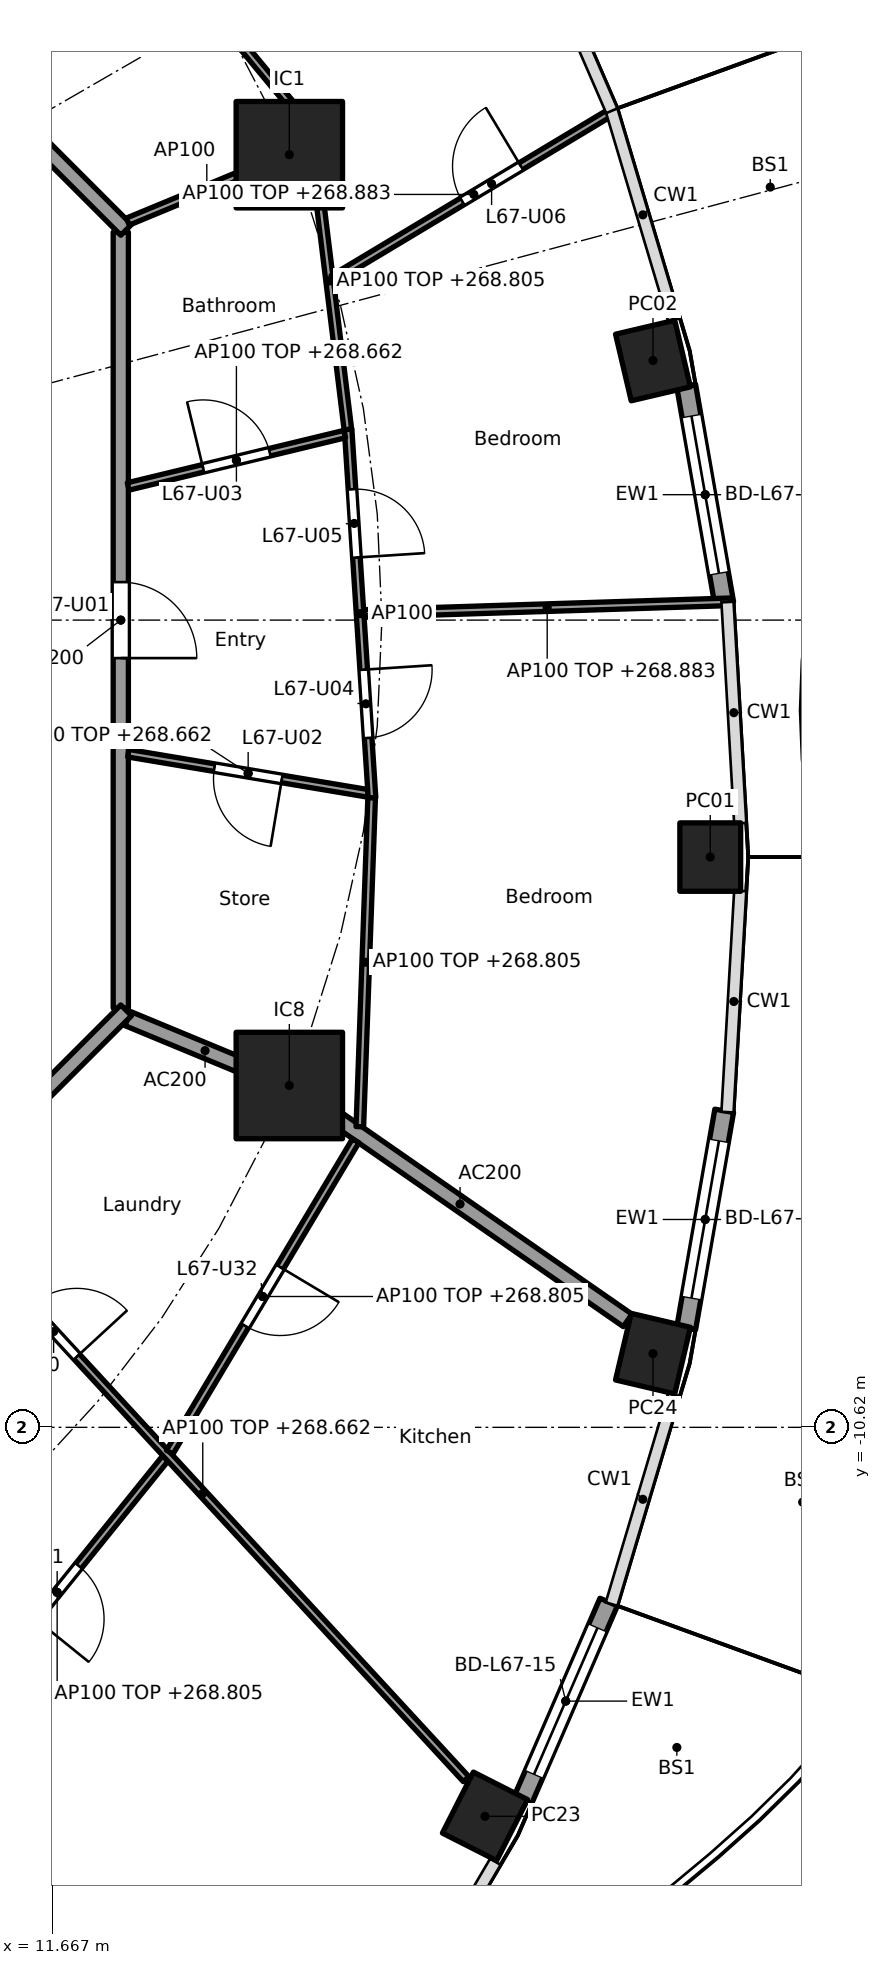
"""IFC4 building model, lengths in metres.
Left out: names, types, materials, properties, quantities, classifications, styles, units other than length and angle.
Written with IfcOpenShell. Run it as: python <this file> out.ifc"""

import sys

from ifc_helpers import new_model, si_unit, direction, frame, frame_2d, origin, origin_2d, place, context, subcontext, project, spatial, rectangle, hollow_rectangle, extrude, element, fill, save


model = new_model("IFC4")
c1 = context("Model", 3, precision=1e-05, world=origin(), true_north=direction((0.0, 1.0)))
c2 = subcontext(c1, "Body", "Model", "MODEL_VIEW")
j1 = project(units=[si_unit("LENGTHUNIT", "METRE"), si_unit("PLANEANGLEUNIT", "RADIAN")], contexts=[c1])
p1 = place(None, origin())
s1 = spatial("IfcSite", under=j1, at=p1, CompositionType="ELEMENT")
p2 = place(p1, origin())
s2 = spatial("IfcBuilding", under=s1, at=p2, CompositionType="ELEMENT")
p3 = place(p2, frame((0.0, 0.0, 265.9)))
s3 = spatial("IfcBuildingStorey", under=s2, at=p3, CompositionType="ELEMENT", Elevation=265.9)
for number, where, z_axis, x_axis in (
    (1, (20.32, -3.118, 0.0), (0.0, 0.0, 1.0), (0.0, 1.0, 0.0)),
    (2, (19.566, 3.415, 0.0), (0.0, 0.0, 1.0), (-0.229, 0.973, 0.0)),
    (3, (17.356, -15.738, 0.0), (0.0, 0.0, 1.0), (0.452, 0.892, 0.0)),
    (4, (19.566, -9.65, 0.0), (0.0, 0.0, 1.0), (0.229, 0.973, 0.0)),
):
    element("IfcColumn", number, at=place(p3, frame(where, z_axis=z_axis, x_axis=x_axis)), inside=s3, PredefinedType="COLUMN", context=c2, shape_type="SweptSolid", body=[
        extrude(hollow_rectangle(XDim=0.9, YDim=0.8, WallThickness=0.028, at=origin_2d()), origin(), (0.0, 0.0, 1.0), 3.7),
    ])
for number, where, z_axis, x_axis in (
    (5, (14.782, 6.123, 0.0), (0.0, 0.0, 1.0), (1.0, 0.0, 0.0)),
    (6, (14.782, -6.123, 0.0), (0.0, 0.0, 1.0), (1.0, 0.0, 0.0)),
):
    element("IfcColumn", number, at=place(p3, frame(where, z_axis=z_axis, x_axis=x_axis)), inside=s3, PredefinedType="COLUMN", context=c2, shape_type="SweptSolid", body=[
        extrude(rectangle(XDim=1.4, YDim=1.4, at=origin_2d()), origin(), (0.0, 0.0, 1.0), 3.7),
    ])
p4 = place(p3, frame((20.004, 3.08, 0.0), z_axis=(0.0, 0.0, 1.0), x_axis=(0.172182411767, -0.985065082661, 0.0)))
e7 = element("IfcWall", 7, at=p4, inside=s3, PredefinedType="SOLIDWALL", context=c2, shape_type="SweptSolid", body=[
    extrude(rectangle(XDim=2.903, YDim=0.25, at=frame_2d((1.451, 0.0))), origin(), (0.0, 0.0, 1.0), 3.44),
])
p5 = place(p4, frame((0.401, 0.0, 0.0)))
e8 = element("IfcOpeningElement", 8, at=p5, cuts=e7, PredefinedType="OPENING", context=c2, shape_type="SweptSolid", body=[
    extrude(rectangle(XDim=2.1, YDim=2.4, at=frame_2d((1.05, 1.2))), frame((0.0, 0.135, 0.0), z_axis=(0.0, -1.0, 0.0), x_axis=(1.0, 0.0, 0.0)), (0.0, 0.0, 1.0), 0.27),
])
p6 = place(p3, frame((18.983, -12.918, 0.0), z_axis=(0.0, 0.0, 1.0), x_axis=(-0.397597791596, -0.9175598052, 0.0)))
e9 = element("IfcWall", 9, at=p6, inside=s3, PredefinedType="SOLIDWALL", context=c2, shape_type="SweptSolid", body=[
    extrude(rectangle(XDim=2.841, YDim=0.25, at=frame_2d((1.42, 0.0))), origin(), (0.0, 0.0, 1.0), 3.44),
])
p7 = place(p6, frame((0.371, 0.0, 0.0)))
e10 = element("IfcOpeningElement", 10, at=p7, cuts=e9, PredefinedType="OPENING", context=c2, shape_type="SweptSolid", body=[
    extrude(rectangle(XDim=2.1, YDim=2.4, at=frame_2d((1.05, 1.2))), frame((0.0, 0.135, 0.0), z_axis=(0.0, -1.0, 0.0), x_axis=(1.0, 0.0, 0.0)), (0.0, 0.0, 1.0), 0.27),
])
p8 = place(p3, frame((20.503, -6.456, 0.0), z_axis=(0.0, 0.0, 1.0), x_axis=(-0.172182411767, -0.985065082661, 0.0)))
e11 = element("IfcWall", 11, at=p8, inside=s3, PredefinedType="SOLIDWALL", context=c2, shape_type="SweptSolid", body=[
    extrude(rectangle(XDim=2.903, YDim=0.25, at=frame_2d((1.451, 0.0))), origin(), (0.0, 0.0, 1.0), 3.44),
])
p9 = place(p8, frame((0.401, 0.0, 0.0)))
e12 = element("IfcOpeningElement", 12, at=p9, cuts=e11, PredefinedType="OPENING", context=c2, shape_type="SweptSolid", body=[
    extrude(rectangle(XDim=2.1, YDim=2.4, at=frame_2d((1.05, 1.2))), frame((0.0, 0.135, 0.0), z_axis=(0.0, -1.0, 0.0), x_axis=(1.0, 0.0, 0.0)), (0.0, 0.0, 1.0), 0.27),
])
p10 = place(p3, frame((12.657, -5.243, 0.0), z_axis=(0.0, 0.0, 1.0), x_axis=(0.92383017907, -0.382802560388, 0.0)))
e13 = element("IfcWall", 13, at=p10, inside=s3, PredefinedType="PARTITIONING", context=c2, shape_type="SweptSolid", body=[
    extrude(rectangle(XDim=2.2, YDim=0.2, at=frame_2d((1.1, 0.0))), origin(), (0.0, 0.0, 1.0), 3.44),
])
p11 = place(p3, frame((14.823, -6.151, 0.0), z_axis=(0.0, 0.0, 1.0), x_axis=(0.821435065081, -0.570302054928, 0.0)))
e14 = element("IfcWall", 14, at=p11, inside=s3, PredefinedType="PARTITIONING", context=c2, shape_type="SweptSolid", body=[
    extrude(rectangle(XDim=5.368, YDim=0.2, at=frame_2d((2.684, 0.0))), origin(), (0.0, 0.0, 1.0), 3.44),
])
p12 = place(p3, frame((12.565, -5.104, 0.0), z_axis=(0.0, 0.0, 1.0), x_axis=(0.0, 1.0, 0.0)))
e15 = element("IfcWall", 15, at=p12, inside=s3, PredefinedType="PARTITIONING", context=c2, shape_type="SweptSolid", body=[
    extrude(rectangle(XDim=10.209, YDim=0.2, at=frame_2d((5.104, 0.0))), origin(), (0.0, 0.0, 1.0), 3.44),
])
p13 = place(p12, frame((4.604, 0.0, 0.0)))
e16 = element("IfcOpeningElement", 16, at=p13, cuts=e15, PredefinedType="OPENING", context=c2, shape_type="SweptSolid", body=[
    extrude(rectangle(XDim=1.0, YDim=2.1, at=frame_2d((0.5, 1.05))), frame((0.0, 0.11, 0.0), z_axis=(0.0, -1.0, 0.0), x_axis=(1.0, 0.0, 0.0)), (0.0, 0.0, 1.0), 0.22),
])
p14 = place(p3, frame((12.635, 5.134, 0.0), z_axis=(0.0, 0.0, 1.0), x_axis=(-0.707106781187, 0.707106781187, 0.0)))
e17 = element("IfcWall", 17, at=p14, inside=s3, PredefinedType="PARTITIONING", context=c2, shape_type="SweptSolid", body=[
    extrude(rectangle(XDim=10.609, YDim=0.2, at=frame_2d((5.305, 0.0))), origin(), (0.0, 0.0, 1.0), 3.44),
])
p15 = place(p3, frame((5.275, -12.494, 0.0), z_axis=(0.0, 0.0, 1.0), x_axis=(0.707106781187, 0.707106781187, 0.0)))
e18 = element("IfcWall", 18, at=p15, inside=s3, PredefinedType="PARTITIONING", context=c2, shape_type="SweptSolid", body=[
    extrude(rectangle(XDim=10.409, YDim=0.2, at=frame_2d((5.205, 0.0))), origin(), (0.0, 0.0, 1.0), 3.44),
])
p16 = place(p15, frame((4.604, 0.0, 0.0)))
e19 = element("IfcOpeningElement", 19, at=p16, cuts=e18, PredefinedType="OPENING", context=c2, shape_type="SweptSolid", body=[
    extrude(rectangle(XDim=1.0, YDim=2.1, at=frame_2d((0.5, 1.05))), frame((0.0, 0.11, 0.0), z_axis=(0.0, -1.0, 0.0), x_axis=(1.0, 0.0, 0.0)), (0.0, 0.0, 1.0), 0.22),
])
p17 = place(p3, frame((12.663, -1.751, 0.0), z_axis=(0.0, 0.0, 1.0), x_axis=(0.98626156497, -0.165191178529, 0.0)))
e20 = element("IfcWall", 20, at=p17, inside=s3, PredefinedType="PARTITIONING", context=c2, shape_type="SweptSolid", body=[
    extrude(rectangle(XDim=3.198, YDim=0.1, at=frame_2d((1.599, 0.0))), origin(), (0.0, 0.0, 1.0), 2.762),
])
p18 = place(p17, frame((1.149, 0.0, 0.0)))
e21 = element("IfcOpeningElement", 21, at=p18, cuts=e20, PredefinedType="OPENING", context=c2, shape_type="SweptSolid", body=[
    extrude(rectangle(XDim=0.9, YDim=2.1, at=frame_2d((0.45, 1.05))), frame((0.0, 0.06, 0.0), z_axis=(0.0, -1.0, 0.0), x_axis=(1.0, 0.0, 0.0)), (0.0, 0.0, 1.0), 0.12),
])
p19 = place(p3, frame((15.87, -2.338, 0.0), z_axis=(0.0, 0.0, 1.0), x_axis=(-0.064797294757, 0.997898447034, 0.0)))
e22 = element("IfcWall", 22, at=p19, inside=s3, PredefinedType="PARTITIONING", context=c2, shape_type="SweptSolid", body=[
    extrude(rectangle(XDim=4.857, YDim=0.1, at=frame_2d((2.428, 0.0))), origin(), (0.0, 0.0, 1.0), 3.44),
])
p20 = place(p19, frame((0.789, 0.0, 0.0)))
e23 = element("IfcOpeningElement", 23, at=p20, cuts=e22, PredefinedType="OPENING", context=c2, shape_type="SweptSolid", body=[
    extrude(rectangle(XDim=0.9, YDim=2.1, at=frame_2d((0.45, 1.05))), frame((0.0, 0.06, 0.0), z_axis=(0.0, -1.0, 0.0), x_axis=(1.0, 0.0, 0.0)), (0.0, 0.0, 1.0), 0.12),
])
p21 = place(p19, frame((3.167, 0.0, 0.0)))
e24 = element("IfcOpeningElement", 24, at=p21, cuts=e22, PredefinedType="OPENING", context=c2, shape_type="SweptSolid", body=[
    extrude(rectangle(XDim=0.9, YDim=2.1, at=frame_2d((0.45, 1.05))), frame((0.0, 0.06, 0.0), z_axis=(0.0, -1.0, 0.0), x_axis=(1.0, 0.0, 0.0)), (0.0, 0.0, 1.0), 0.12),
])
p22 = place(p3, frame((15.865, -2.338, 0.0), z_axis=(0.0, 0.0, 1.0), x_axis=(-0.035864509465, -0.999356661538, 0.0)))
e25 = element("IfcWall", 25, at=p22, inside=s3, PredefinedType="PARTITIONING", context=c2, shape_type="SweptSolid", body=[
    extrude(rectangle(XDim=4.329, YDim=0.1, at=frame_2d((2.165, 0.0))), origin(), (0.0, 0.0, 1.0), 2.905),
])
p23 = place(p3, frame((15.763, 0.087, 0.0), z_axis=(0.0, 0.0, 1.0), x_axis=(0.999492034598, 0.03186962151, 0.0)))
e26 = element("IfcWall", 26, at=p23, inside=s3, PredefinedType="PARTITIONING", context=c2, shape_type="SweptSolid", body=[
    extrude(rectangle(XDim=4.826, YDim=0.1, at=frame_2d((2.413, 0.0))), origin(), (0.0, 0.0, 1.0), 2.983),
])
p24 = place(p3, frame((12.662, 1.758, 0.0), z_axis=(0.0, 0.0, 1.0), x_axis=(0.972004827836, 0.234960879007, 0.0)))
e27 = element("IfcWall", 27, at=p24, inside=s3, PredefinedType="PARTITIONING", context=c2, shape_type="SweptSolid", body=[
    extrude(rectangle(XDim=2.93, YDim=0.1, at=frame_2d((1.465, 0.0))), origin(), (0.0, 0.0, 1.0), 2.762),
])
p25 = place(p24, frame((1.015, 0.0, 0.0)))
e28 = element("IfcOpeningElement", 28, at=p25, cuts=e27, PredefinedType="OPENING", context=c2, shape_type="SweptSolid", body=[
    extrude(rectangle(XDim=0.9, YDim=2.1, at=frame_2d((0.45, 1.05))), frame((0.0, 0.06, 0.0), z_axis=(0.0, -1.0, 0.0), x_axis=(1.0, 0.0, 0.0)), (0.0, 0.0, 1.0), 0.12),
])
p26 = place(p3, frame((15.552, 2.508, 0.0), z_axis=(0.0, 0.0, 1.0), x_axis=(-0.12196631785, 0.992534239868, 0.0)))
e29 = element("IfcWall", 29, at=p26, inside=s3, PredefinedType="PARTITIONING", context=c2, shape_type="SweptSolid", body=[
    extrude(rectangle(XDim=3.937, YDim=0.1, at=frame_2d((1.969, 0.0))), origin(), (0.0, 0.0, 1.0), 2.905),
])
p27 = place(p3, frame((15.355, 4.488, 0.0), z_axis=(0.0, 0.0, 1.0), x_axis=(0.85763237524, 0.514263268123, 0.0)))
e30 = element("IfcWall", 30, at=p27, inside=s3, PredefinedType="PARTITIONING", context=c2, shape_type="SweptSolid", body=[
    extrude(rectangle(XDim=4.324, YDim=0.1, at=frame_2d((2.162, 0.0))), origin(), (0.0, 0.0, 1.0), 2.983),
])
p28 = place(p27, frame((1.985, 0.0, 0.0)))
e31 = element("IfcOpeningElement", 31, at=p28, cuts=e30, PredefinedType="OPENING", context=c2, shape_type="SweptSolid", body=[
    extrude(rectangle(XDim=0.9, YDim=2.1, at=frame_2d((0.45, 1.05))), frame((0.0, 0.06, 0.0), z_axis=(0.0, -1.0, 0.0), x_axis=(1.0, 0.0, 0.0)), (0.0, 0.0, 1.0), 0.12),
])
p29 = place(p3, frame((12.657, 5.243, 0.0), z_axis=(0.0, 0.0, 1.0), x_axis=(0.923864733477, 0.382719158442, 0.0)))
e32 = element("IfcWall", 32, at=p29, inside=s3, PredefinedType="PARTITIONING", context=c2, shape_type="SweptSolid", body=[
    extrude(rectangle(XDim=2.25, YDim=0.1, at=frame_2d((1.125, 0.0))), origin(), (0.0, 0.0, 1.0), 3.44),
])
p30 = place(p3, frame((15.098, 6.427, 0.0), z_axis=(0.0, 0.0, 1.0), x_axis=(-0.637936555536, 0.770088924158, 0.0)))
e33 = element("IfcWall", 33, at=p30, inside=s3, PredefinedType="PARTITIONING", context=c2, shape_type="SweptSolid", body=[
    extrude(rectangle(XDim=6.46, YDim=0.1, at=frame_2d((3.23, 0.0))), origin(), (0.0, 0.0, 1.0), 2.905),
])
p31 = place(p30, frame((2.78, 0.0, 0.0)))
e34 = element("IfcOpeningElement", 34, at=p31, cuts=e33, PredefinedType="OPENING", context=c2, shape_type="SweptSolid", body=[
    extrude(rectangle(XDim=0.9, YDim=2.1, at=frame_2d((0.45, 1.05))), frame((0.0, 0.06, 0.0), z_axis=(0.0, -1.0, 0.0), x_axis=(1.0, 0.0, 0.0)), (0.0, 0.0, 1.0), 0.12),
])
p32 = place(p3, frame((8.677, -16.173, 0.0), z_axis=(0.0, 0.0, 1.0), x_axis=(0.408174671437, -0.912903849043, 0.0)))
e35 = element("IfcWall", 35, at=p32, inside=s3, PredefinedType="PARTITIONING", context=c2, shape_type="SweptSolid", body=[
    extrude(rectangle(XDim=8.028, YDim=0.1, at=frame_2d((4.014, 0.0))), origin(), (0.0, 0.0, 1.0), 2.983),
])
p33 = place(p3, frame((10.304, -14.555, 0.0), z_axis=(0.0, 0.0, 1.0), x_axis=(0.628170338674, 0.778075848237, 0.0)))
e36 = element("IfcWall", 36, at=p33, inside=s3, PredefinedType="PARTITIONING", context=c2, shape_type="SweptSolid", body=[
    extrude(rectangle(XDim=4.532, YDim=0.1, at=frame_2d((2.266, 0.0))), origin(), (0.0, 0.0, 1.0), 2.905),
])
p34 = place(p33, frame((1.816, 0.0, 0.0)))
e37 = element("IfcOpeningElement", 37, at=p34, cuts=e36, PredefinedType="OPENING", context=c2, shape_type="SweptSolid", body=[
    extrude(rectangle(XDim=0.9, YDim=2.1, at=frame_2d((0.45, 1.05))), frame((0.0, 0.06, 0.0), z_axis=(0.0, -1.0, 0.0), x_axis=(1.0, 0.0, 0.0)), (0.0, 0.0, 1.0), 0.12),
])
p35 = place(p3, frame((10.179, -7.731, 0.0), z_axis=(0.0, 0.0, 1.0), x_axis=(0.67775318564, -0.73528947997, 0.0)))
e38 = element("IfcWall", 38, at=p35, inside=s3, PredefinedType="PARTITIONING", context=c2, shape_type="SweptSolid", body=[
    extrude(rectangle(XDim=10.222, YDim=0.1, at=frame_2d((5.111, 0.0))), origin(), (0.0, 0.0, 1.0), 2.762),
])
p36 = place(p35, frame((1.766, 0.0, 0.0)))
e39 = element("IfcOpeningElement", 39, at=p36, cuts=e38, PredefinedType="OPENING", context=c2, shape_type="SweptSolid", body=[
    extrude(rectangle(XDim=0.9, YDim=2.1, at=frame_2d((0.45, 1.05))), frame((0.0, 0.06, 0.0), z_axis=(0.0, -1.0, 0.0), x_axis=(1.0, 0.0, 0.0)), (0.0, 0.0, 1.0), 0.12),
])
p37 = place(p3, frame((13.208, -10.947, 0.0), z_axis=(0.0, 0.0, 1.0), x_axis=(0.512726452516, 0.858552028063, 0.0)))
e40 = element("IfcWall", 40, at=p37, inside=s3, PredefinedType="PARTITIONING", context=c2, shape_type="SweptSolid", body=[
    extrude(rectangle(XDim=4.772, YDim=0.1, at=frame_2d((2.386, 0.0))), origin(), (0.0, 0.0, 1.0), 2.905),
])
p38 = place(p37, frame((1.936, 0.0, 0.0)))
e41 = element("IfcOpeningElement", 41, at=p38, cuts=e40, PredefinedType="OPENING", context=c2, shape_type="SweptSolid", body=[
    extrude(rectangle(XDim=0.9, YDim=2.1, at=frame_2d((0.45, 1.05))), frame((0.0, 0.06, 0.0), z_axis=(0.0, -1.0, 0.0), x_axis=(1.0, 0.0, 0.0)), (0.0, 0.0, 1.0), 0.12),
])
p39 = place(p5, origin())
e42 = element("IfcDoor", 42, at=p39, inside=s3, OperationType="SLIDING_TO_LEFT", PredefinedType="DOOR", context=c2, shape_type="SweptSolid", body=[
    extrude(rectangle(XDim=2.1, YDim=2.4, at=frame_2d((1.05, 1.2))), frame((0.0, 0.025, 0.0), z_axis=(0.0, -1.0, 0.0), x_axis=(1.0, 0.0, 0.0)), (0.0, 0.0, 1.0), 0.05),
])
fill(e8, e42)
p40 = place(p7, origin())
e43 = element("IfcDoor", 43, at=p40, inside=s3, OperationType="SLIDING_TO_LEFT", PredefinedType="DOOR", context=c2, shape_type="SweptSolid", body=[
    extrude(rectangle(XDim=2.1, YDim=2.4, at=frame_2d((1.05, 1.2))), frame((0.0, 0.025, 0.0), z_axis=(0.0, -1.0, 0.0), x_axis=(1.0, 0.0, 0.0)), (0.0, 0.0, 1.0), 0.05),
])
fill(e10, e43)
p41 = place(p9, origin())
e44 = element("IfcDoor", 44, at=p41, inside=s3, OperationType="SLIDING_TO_LEFT", PredefinedType="DOOR", context=c2, shape_type="SweptSolid", body=[
    extrude(rectangle(XDim=2.1, YDim=2.4, at=frame_2d((1.05, 1.2))), frame((0.0, 0.025, 0.0), z_axis=(0.0, -1.0, 0.0), x_axis=(1.0, 0.0, 0.0)), (0.0, 0.0, 1.0), 0.05),
])
fill(e12, e44)
p42 = place(p13, frame((1.0, 0.0, 0.0), x_axis=(-1.0, 0.0, 0.0)))
e45 = element("IfcDoor", 45, at=p42, inside=s3, OperationType="SINGLE_SWING_RIGHT", PredefinedType="DOOR", context=c2, shape_type="SweptSolid", body=[
    extrude(rectangle(XDim=1.0, YDim=2.1, at=frame_2d((0.5, 1.05))), frame((0.0, 0.025, 0.0), z_axis=(0.0, -1.0, 0.0), x_axis=(1.0, 0.0, 0.0)), (0.0, 0.0, 1.0), 0.05),
])
fill(e16, e45)
p43 = place(p18, frame((0.9, 0.0, 0.0), x_axis=(-1.0, 0.0, 0.0)))
e46 = element("IfcDoor", 46, at=p43, inside=s3, OperationType="SINGLE_SWING_LEFT", PredefinedType="DOOR", context=c2, shape_type="SweptSolid", body=[
    extrude(rectangle(XDim=0.9, YDim=2.1, at=frame_2d((0.45, 1.05))), frame((0.0, 0.025, 0.0), z_axis=(0.0, -1.0, 0.0), x_axis=(1.0, 0.0, 0.0)), (0.0, 0.0, 1.0), 0.05),
])
fill(e21, e46)
p44 = place(p25, origin())
e47 = element("IfcDoor", 47, at=p44, inside=s3, OperationType="SINGLE_SWING_LEFT", PredefinedType="DOOR", context=c2, shape_type="SweptSolid", body=[
    extrude(rectangle(XDim=0.9, YDim=2.1, at=frame_2d((0.45, 1.05))), frame((0.0, 0.025, 0.0), z_axis=(0.0, -1.0, 0.0), x_axis=(1.0, 0.0, 0.0)), (0.0, 0.0, 1.0), 0.05),
])
fill(e28, e47)
p45 = place(p20, frame((0.9, 0.0, 0.0), x_axis=(-1.0, 0.0, 0.0)))
e48 = element("IfcDoor", 48, at=p45, inside=s3, OperationType="SINGLE_SWING_LEFT", PredefinedType="DOOR", context=c2, shape_type="SweptSolid", body=[
    extrude(rectangle(XDim=0.9, YDim=2.1, at=frame_2d((0.45, 1.05))), frame((0.0, 0.025, 0.0), z_axis=(0.0, -1.0, 0.0), x_axis=(1.0, 0.0, 0.0)), (0.0, 0.0, 1.0), 0.05),
])
fill(e23, e48)
p46 = place(p21, frame((0.9, 0.0, 0.0), x_axis=(-1.0, 0.0, 0.0)))
e49 = element("IfcDoor", 49, at=p46, inside=s3, OperationType="SINGLE_SWING_RIGHT", PredefinedType="DOOR", context=c2, shape_type="SweptSolid", body=[
    extrude(rectangle(XDim=0.9, YDim=2.1, at=frame_2d((0.45, 1.05))), frame((0.0, 0.025, 0.0), z_axis=(0.0, -1.0, 0.0), x_axis=(1.0, 0.0, 0.0)), (0.0, 0.0, 1.0), 0.05),
])
fill(e24, e49)
p47 = place(p28, origin())
e50 = element("IfcDoor", 50, at=p47, inside=s3, OperationType="SINGLE_SWING_RIGHT", PredefinedType="DOOR", context=c2, shape_type="SweptSolid", body=[
    extrude(rectangle(XDim=0.9, YDim=2.1, at=frame_2d((0.45, 1.05))), frame((0.0, 0.025, 0.0), z_axis=(0.0, -1.0, 0.0), x_axis=(1.0, 0.0, 0.0)), (0.0, 0.0, 1.0), 0.05),
])
fill(e31, e50)
p48 = place(p36, origin())
e51 = element("IfcDoor", 51, at=p48, inside=s3, OperationType="SINGLE_SWING_RIGHT", PredefinedType="DOOR", context=c2, shape_type="SweptSolid", body=[
    extrude(rectangle(XDim=0.9, YDim=2.1, at=frame_2d((0.45, 1.05))), frame((0.0, 0.025, 0.0), z_axis=(0.0, -1.0, 0.0), x_axis=(1.0, 0.0, 0.0)), (0.0, 0.0, 1.0), 0.05),
])
fill(e39, e51)
p49 = place(p34, frame((0.9, 0.0, 0.0), x_axis=(-1.0, 0.0, 0.0)))
e52 = element("IfcDoor", 52, at=p49, inside=s3, OperationType="SINGLE_SWING_RIGHT", PredefinedType="DOOR", context=c2, shape_type="SweptSolid", body=[
    extrude(rectangle(XDim=0.9, YDim=2.1, at=frame_2d((0.45, 1.05))), frame((0.0, 0.025, 0.0), z_axis=(0.0, -1.0, 0.0), x_axis=(1.0, 0.0, 0.0)), (0.0, 0.0, 1.0), 0.05),
])
fill(e37, e52)
p50 = place(p38, frame((0.9, 0.0, 0.0), x_axis=(-1.0, 0.0, 0.0)))
e53 = element("IfcDoor", 53, at=p50, inside=s3, OperationType="SINGLE_SWING_LEFT", PredefinedType="DOOR", context=c2, shape_type="SweptSolid", body=[
    extrude(rectangle(XDim=0.9, YDim=2.1, at=frame_2d((0.45, 1.05))), frame((0.0, 0.025, 0.0), z_axis=(0.0, -1.0, 0.0), x_axis=(1.0, 0.0, 0.0)), (0.0, 0.0, 1.0), 0.05),
])
fill(e41, e53)
save(model, sys.argv[1])
